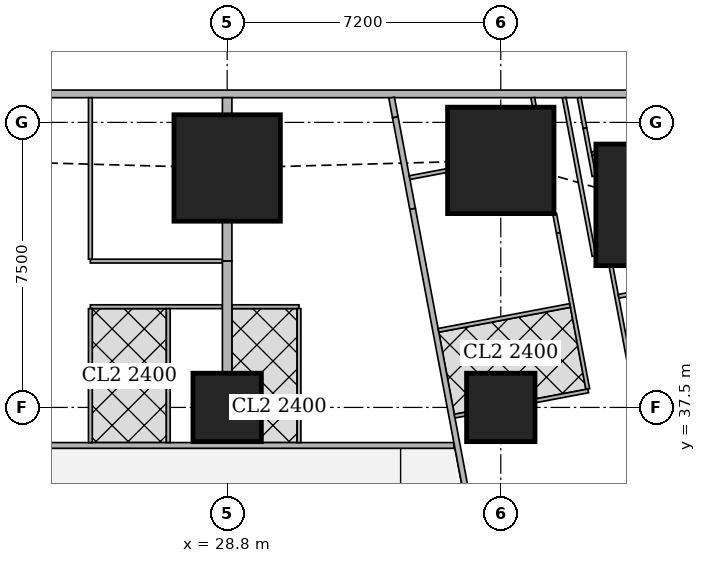
"""IFC4 building model, lengths in metres.
Left out: names, types, materials, properties, quantities, classifications, styles, units other than length and angle.
Written with IfcOpenShell. Run it as: python <this file> out.ifc"""

import sys

from ifc_helpers import new_model, si_unit, direction, frame, frame_2d, origin, origin_2d, place, context, subcontext, project, spatial, rectangle, extrude, element, fill, save


model = new_model("IFC4")
c1 = context("Model", 3, precision=1e-05, world=origin(), true_north=direction((0.0, 1.0)))
c2 = subcontext(c1, "Body", "Model", "MODEL_VIEW")
j1 = project(units=[si_unit("LENGTHUNIT", "METRE"), si_unit("PLANEANGLEUNIT", "RADIAN")], contexts=[c1])
p1 = place(None, origin())
s1 = spatial("IfcSite", under=j1, at=p1, CompositionType="ELEMENT")
p2 = place(p1, origin())
s2 = spatial("IfcBuilding", under=s1, at=p2, CompositionType="ELEMENT")
p3 = place(p2, frame((0.0, 0.0, 42.5)))
s3 = spatial("IfcBuildingStorey", under=s2, at=p3, CompositionType="ELEMENT", Elevation=42.5)
for number, where, z_axis, x_axis in (
    (1, (28.8, 37.5, 0.0), (0.0, 0.0, 1.0), (1.0, 0.0, 0.0)),
    (2, (36.0, 37.5, 0.0), (0.0, 0.0, 1.0), (1.0, 0.0, 0.0)),
):
    element("IfcColumn", number, at=place(p3, frame(where, z_axis=z_axis, x_axis=x_axis)), inside=s3, PredefinedType="COLUMN", context=c2, shape_type="SweptSolid", body=[
        extrude(rectangle(XDim=1.8, YDim=1.8, at=origin_2d()), origin(), (0.0, 0.0, 1.0), 3.75),
    ])
p4 = place(p3, frame((40.102, 42.83, 0.0), z_axis=(0.0, 0.0, 1.0), x_axis=(1.0, 0.0, 0.0)))
e3 = element("IfcColumn", 3, at=p4, inside=s3, PredefinedType="COLUMN", context=c2, shape_type="SweptSolid", body=[
    extrude(rectangle(XDim=3.2, YDim=3.2, at=origin_2d()), origin(), (0.0, 0.0, 1.0), 3.75),
])
for number, where, z_axis, x_axis in (
    (4, (28.8, 43.8, 0.0), (0.0, 0.0, 1.0), (1.0, 0.0, 0.0)),
    (5, (36.0, 44.0, 0.0), (0.0, 0.0, 1.0), (1.0, 0.0, 0.0)),
):
    element("IfcColumn", number, at=place(p3, frame(where, z_axis=z_axis, x_axis=x_axis)), inside=s3, PredefinedType="COLUMN", context=c2, shape_type="SweptSolid", body=[
        extrude(rectangle(XDim=2.8, YDim=2.8, at=origin_2d()), origin(), (0.0, 0.0, 1.0), 3.75),
    ])
p5 = place(p3, frame((40.106, 45.75, 0.0), z_axis=(0.0, 0.0, 1.0), x_axis=(-1.0, 0.0, 0.0)))
e6 = element("IfcWall", 6, at=p5, inside=s3, PredefinedType="SOLIDWALL", context=c2, shape_type="SweptSolid", body=[
    extrude(rectangle(XDim=37.943, YDim=0.2, at=frame_2d((18.971, 0.0))), origin(), (0.0, 0.0, 1.0), 3.5),
])
p6 = place(p5, frame((8.606, 0.0, 0.9)))
e7 = element("IfcOpeningElement", 7, at=p6, cuts=e6, PredefinedType="OPENING", context=c2, shape_type="SweptSolid", body=[
    extrude(rectangle(XDim=1.8, YDim=1.5, at=frame_2d((0.9, 0.75))), frame((0.0, 0.11, 0.0), z_axis=(0.0, -1.0, 0.0), x_axis=(1.0, 0.0, 0.0)), (0.0, 0.0, 1.0), 0.22),
])
p7 = place(p5, frame((12.206, 0.0, 0.9)))
e8 = element("IfcOpeningElement", 8, at=p7, cuts=e6, PredefinedType="OPENING", context=c2, shape_type="SweptSolid", body=[
    extrude(rectangle(XDim=1.8, YDim=1.5, at=frame_2d((0.9, 0.75))), frame((0.0, 0.11, 0.0), z_axis=(0.0, -1.0, 0.0), x_axis=(1.0, 0.0, 0.0)), (0.0, 0.0, 1.0), 0.22),
])
p8 = place(p5, frame((15.806, 0.0, 0.9)))
e9 = element("IfcOpeningElement", 9, at=p8, cuts=e6, PredefinedType="OPENING", context=c2, shape_type="SweptSolid", body=[
    extrude(rectangle(XDim=1.8, YDim=1.5, at=frame_2d((0.9, 0.75))), frame((0.0, 0.11, 0.0), z_axis=(0.0, -1.0, 0.0), x_axis=(1.0, 0.0, 0.0)), (0.0, 0.0, 1.0), 0.22),
])
p9 = place(p5, frame((19.406, 0.0, 0.9)))
e10 = element("IfcOpeningElement", 10, at=p9, cuts=e6, PredefinedType="OPENING", context=c2, shape_type="SweptSolid", body=[
    extrude(rectangle(XDim=1.8, YDim=1.5, at=frame_2d((0.9, 0.75))), frame((0.0, 0.11, 0.0), z_axis=(0.0, -1.0, 0.0), x_axis=(1.0, 0.0, 0.0)), (0.0, 0.0, 1.0), 0.22),
])
p10 = place(p5, frame((23.006, 0.0, 0.9)))
e11 = element("IfcOpeningElement", 11, at=p10, cuts=e6, PredefinedType="OPENING", context=c2, shape_type="SweptSolid", body=[
    extrude(rectangle(XDim=1.8, YDim=1.5, at=frame_2d((0.9, 0.75))), frame((0.0, 0.11, 0.0), z_axis=(0.0, -1.0, 0.0), x_axis=(1.0, 0.0, 0.0)), (0.0, 0.0, 1.0), 0.22),
])
p11 = place(p5, frame((26.606, 0.0, 0.9)))
e12 = element("IfcOpeningElement", 12, at=p11, cuts=e6, PredefinedType="OPENING", context=c2, shape_type="SweptSolid", body=[
    extrude(rectangle(XDim=1.8, YDim=1.5, at=frame_2d((0.9, 0.75))), frame((0.0, 0.11, 0.0), z_axis=(0.0, -1.0, 0.0), x_axis=(1.0, 0.0, 0.0)), (0.0, 0.0, 1.0), 0.22),
])
p12 = place(p3, frame((8.35, 36.5, 0.0), z_axis=(0.0, 0.0, 1.0), x_axis=(1.0, 0.0, 0.0)))
e13 = element("IfcWall", 13, at=p12, inside=s3, PredefinedType="SOLIDWALL", context=c2, shape_type="SweptSolid", body=[
    extrude(rectangle(XDim=26.415, YDim=0.15, at=frame_2d((13.208, 0.0))), origin(), (0.0, 0.0, 1.0), 3.5),
])
p13 = place(p12, frame((3.383, 0.0, 0.0)))
e14 = element("IfcOpeningElement", 14, at=p13, cuts=e13, PredefinedType="OPENING", context=c2, shape_type="SweptSolid", body=[
    extrude(rectangle(XDim=1.0, YDim=2.1, at=frame_2d((0.5, 1.05))), frame((0.0, 0.085, 0.0), z_axis=(0.0, -1.0, 0.0), x_axis=(1.0, 0.0, 0.0)), (0.0, 0.0, 1.0), 0.17),
])
p14 = place(p12, frame((7.65, 0.0, 0.0)))
e15 = element("IfcOpeningElement", 15, at=p14, cuts=e13, PredefinedType="OPENING", context=c2, shape_type="SweptSolid", body=[
    extrude(rectangle(XDim=1.0, YDim=2.1, at=frame_2d((0.5, 1.05))), frame((0.0, 0.085, 0.0), z_axis=(0.0, -1.0, 0.0), x_axis=(1.0, 0.0, 0.0)), (0.0, 0.0, 1.0), 0.17),
])
p15 = place(p12, frame((14.85, 0.0, 0.0)))
e16 = element("IfcOpeningElement", 16, at=p15, cuts=e13, PredefinedType="OPENING", context=c2, shape_type="SweptSolid", body=[
    extrude(rectangle(XDim=1.0, YDim=2.1, at=frame_2d((0.5, 1.05))), frame((0.0, 0.085, 0.0), z_axis=(0.0, -1.0, 0.0), x_axis=(1.0, 0.0, 0.0)), (0.0, 0.0, 1.0), 0.17),
])
p16 = place(p12, frame((23.923, 0.0, 0.0)))
e17 = element("IfcOpeningElement", 17, at=p16, cuts=e13, PredefinedType="OPENING", context=c2, shape_type="SweptSolid", body=[
    extrude(rectangle(XDim=1.0, YDim=2.1, at=frame_2d((0.5, 1.05))), frame((0.0, 0.085, 0.0), z_axis=(0.0, -1.0, 0.0), x_axis=(1.0, 0.0, 0.0)), (0.0, 0.0, 1.0), 0.17),
])
p17 = place(p3, frame((33.127, 45.65, 0.0), z_axis=(0.0, 0.0, 1.0), x_axis=(0.185441815104, -0.982655246366, 0.0)))
e18 = element("IfcWall", 18, at=p17, inside=s3, PredefinedType="SOLIDWALL", context=c2, shape_type="SweptSolid", body=[
    extrude(rectangle(XDim=0.524, YDim=0.15, at=frame_2d((0.262, 0.0))), origin(), (0.0, 0.0, 1.0), 3.5),
])
p18 = place(p3, frame((33.224, 45.135, 0.0), z_axis=(0.0, 0.0, 1.0), x_axis=(0.185681462868, -0.982609990967, 0.0)))
e19 = element("IfcWall", 19, at=p18, inside=s3, PredefinedType="SOLIDWALL", context=c2, shape_type="SweptSolid", body=[
    extrude(rectangle(XDim=2.455, YDim=0.15, at=frame_2d((1.228, 0.0))), origin(), (0.0, 0.0, 1.0), 2.05),
])
p19 = place(p3, frame((33.68, 42.723, 0.0), z_axis=(0.0, 0.0, 1.0), x_axis=(0.185624129307, -0.98262082342, 0.0)))
e20 = element("IfcWall", 20, at=p19, inside=s3, PredefinedType="SOLIDWALL", context=c2, shape_type="SweptSolid", body=[
    extrude(rectangle(XDim=41.051, YDim=0.15, at=frame_2d((20.526, 0.0))), origin(), (0.0, 0.0, 1.0), 2.5),
])
p20 = place(p19, frame((7.73, 0.0, 0.0)))
e21 = element("IfcOpeningElement", 21, at=p20, cuts=e20, PredefinedType="OPENING", context=c2, shape_type="SweptSolid", body=[
    extrude(rectangle(XDim=1.0, YDim=2.1, at=frame_2d((0.5, 1.05))), frame((0.0, 0.085, 0.0), z_axis=(0.0, -1.0, 0.0), x_axis=(1.0, 0.0, 0.0)), (0.0, 0.0, 1.0), 0.17),
])
p21 = place(p19, frame((12.307, 0.0, 0.0)))
e22 = element("IfcOpeningElement", 22, at=p21, cuts=e20, PredefinedType="OPENING", context=c2, shape_type="SweptSolid", body=[
    extrude(rectangle(XDim=1.0, YDim=2.1, at=frame_2d((0.5, 1.05))), frame((0.0, 0.085, 0.0), z_axis=(0.0, -1.0, 0.0), x_axis=(1.0, 0.0, 0.0)), (0.0, 0.0, 1.0), 0.17),
])
p22 = place(p19, frame((19.938, 0.0, 0.0)))
e23 = element("IfcOpeningElement", 23, at=p22, cuts=e20, PredefinedType="OPENING", context=c2, shape_type="SweptSolid", body=[
    extrude(rectangle(XDim=1.0, YDim=2.1, at=frame_2d((0.5, 1.05))), frame((0.0, 0.085, 0.0), z_axis=(0.0, -1.0, 0.0), x_axis=(1.0, 0.0, 0.0)), (0.0, 0.0, 1.0), 0.17),
])
p23 = place(p19, frame((32.193, 0.0, 0.0)))
e24 = element("IfcOpeningElement", 24, at=p23, cuts=e20, PredefinedType="OPENING", context=c2, shape_type="SweptSolid", body=[
    extrude(rectangle(XDim=1.0, YDim=2.1, at=frame_2d((0.5, 1.05))), frame((0.0, 0.085, 0.0), z_axis=(0.0, -1.0, 0.0), x_axis=(1.0, 0.0, 0.0)), (0.0, 0.0, 1.0), 0.17),
])
p24 = place(p3, frame((38.454, 41.483, 0.0), z_axis=(0.0, 0.0, 1.0), x_axis=(-0.185609245326, 0.982623634994, 0.0)))
e25 = element("IfcWall", 25, at=p24, inside=s3, PredefinedType="PARTITIONING", context=c2, shape_type="SweptSolid", body=[
    extrude(rectangle(XDim=4.241, YDim=0.1, at=frame_2d((2.12, 0.0))), origin(), (0.0, 0.0, 1.0), 2.05),
])
p25 = place(p3, frame((38.063, 45.65, 0.0), z_axis=(0.0, 0.0, 1.0), x_axis=(0.186109918919, -0.982528929895, 0.0)))
e26 = element("IfcWall", 26, at=p25, inside=s3, PredefinedType="PARTITIONING", context=c2, shape_type="SweptSolid", body=[
    extrude(rectangle(XDim=0.817, YDim=0.1, at=frame_2d((0.409, 0.0))), origin(), (0.0, 0.0, 1.0), 3.5),
])
p26 = place(p3, frame((38.215, 44.847, 0.0), z_axis=(0.0, 0.0, 1.0), x_axis=(0.185310800156, -0.982679961811, 0.0)))
e27 = element("IfcWall", 27, at=p26, inside=s3, PredefinedType="PARTITIONING", context=c2, shape_type="SweptSolid", body=[
    extrude(rectangle(XDim=1.283, YDim=0.1, at=frame_2d((0.642, 0.0))), origin(), (0.0, 0.0, 1.0), 2.05),
])
p27 = place(p3, frame((38.899, 41.22, 0.0), z_axis=(0.0, 0.0, 1.0), x_axis=(0.185517409072, -0.982640977637, 0.0)))
e28 = element("IfcWall", 28, at=p27, inside=s3, PredefinedType="PARTITIONING", context=c2, shape_type="SweptSolid", body=[
    extrude(rectangle(XDim=4.426, YDim=0.1, at=frame_2d((2.213, 0.0))), origin(), (0.0, 0.0, 1.0), 3.5),
])
p28 = place(p27, frame((1.9, 0.0, 0.0)))
e29 = element("IfcOpeningElement", 29, at=p28, cuts=e28, PredefinedType="OPENING", context=c2, shape_type="SweptSolid", body=[
    extrude(rectangle(XDim=0.9, YDim=2.1, at=frame_2d((0.45, 1.05))), frame((0.0, 0.06, 0.0), z_axis=(0.0, -1.0, 0.0), x_axis=(1.0, 0.0, 0.0)), (0.0, 0.0, 1.0), 0.12),
])
p29 = place(p3, frame((36.841, 45.65, 0.0), z_axis=(0.0, 0.0, 1.0), x_axis=(0.183986661451, -0.982928740249, 0.0)))
e30 = element("IfcWall", 30, at=p29, inside=s3, PredefinedType="PARTITIONING", context=c2, shape_type="SweptSolid", body=[
    extrude(rectangle(XDim=0.244, YDim=0.1, at=frame_2d((0.122, 0.0))), origin(), (0.0, 0.0, 1.0), 3.5),
])
p30 = place(p3, frame((37.417, 42.602, 0.0), z_axis=(0.0, 0.0, 1.0), x_axis=(0.185672001976, -0.982611778721, 0.0)))
e31 = element("IfcWall", 31, at=p30, inside=s3, PredefinedType="PARTITIONING", context=c2, shape_type="SweptSolid", body=[
    extrude(rectangle(XDim=0.522, YDim=0.1, at=frame_2d((0.261, 0.0))), origin(), (0.0, 0.0, 1.0), 2.05),
])
p31 = place(p3, frame((37.514, 42.089, 0.0), z_axis=(0.0, 0.0, 1.0), x_axis=(0.185540945282, -0.982636533833, 0.0)))
e32 = element("IfcWall", 32, at=p31, inside=s3, PredefinedType="PARTITIONING", context=c2, shape_type="SweptSolid", body=[
    extrude(rectangle(XDim=4.178, YDim=0.1, at=frame_2d((2.089, 0.0))), origin(), (0.0, 0.0, 1.0), 3.5),
])
p32 = place(p31, frame((2.63, 0.0, 0.0)))
e33 = element("IfcOpeningElement", 33, at=p32, cuts=e32, PredefinedType="OPENING", context=c2, shape_type="SweptSolid", body=[
    extrude(rectangle(XDim=0.9, YDim=2.1, at=frame_2d((0.45, 1.05))), frame((0.0, 0.06, 0.0), z_axis=(0.0, -1.0, 0.0), x_axis=(1.0, 0.0, 0.0)), (0.0, 0.0, 1.0), 0.12),
])
p33 = place(p3, frame((38.492, 44.193, 0.0), z_axis=(0.0, 0.0, 1.0), x_axis=(-0.981954528773, -0.189117168504, 0.0)))
e34 = element("IfcWall", 34, at=p33, inside=s3, PredefinedType="PARTITIONING", context=c2, shape_type="SweptSolid", body=[
    extrude(rectangle(XDim=0.101, YDim=0.1, at=frame_2d((0.05, 0.0))), origin(), (0.0, 0.0, 1.0), 2.05),
])
p34 = place(p3, frame((43.277, 41.212, 0.0), z_axis=(0.0, 0.0, 1.0), x_axis=(-0.982665405803, -0.185387972203, 0.0)))
e35 = element("IfcWall", 35, at=p34, inside=s3, PredefinedType="PARTITIONING", context=c2, shape_type="SweptSolid", body=[
    extrude(rectangle(XDim=4.25, YDim=0.1, at=frame_2d((2.125, 0.0))), origin(), (0.0, 0.0, 1.0), 2.05),
])
p35 = place(p3, frame((34.59, 43.734, 0.0), z_axis=(0.0, 0.0, 1.0), x_axis=(-0.982632457012, -0.185562535081, 0.0)))
e36 = element("IfcWall", 36, at=p35, inside=s3, PredefinedType="PARTITIONING", context=c2, shape_type="SweptSolid", body=[
    extrude(rectangle(XDim=1.007, YDim=0.1, at=frame_2d((0.503, 0.0))), origin(), (0.0, 0.0, 1.0), 2.05),
])
p36 = place(p3, frame((37.823, 40.182, 0.0), z_axis=(0.0, 0.0, 1.0), x_axis=(-0.98263926043, -0.185526504472, 0.0)))
e37 = element("IfcWall", 37, at=p36, inside=s3, PredefinedType="PARTITIONING", context=c2, shape_type="SweptSolid", body=[
    extrude(rectangle(XDim=3.524, YDim=0.1, at=frame_2d((1.762, 0.0))), origin(), (0.0, 0.0, 1.0), 3.5),
])
p37 = place(p3, frame((38.299, 37.935, 0.0), z_axis=(0.0, 0.0, 1.0), x_axis=(-0.982680053146, -0.185310315822, 0.0)))
e38 = element("IfcWall", 38, at=p37, inside=s3, PredefinedType="PARTITIONING", context=c2, shape_type="SweptSolid", body=[
    extrude(rectangle(XDim=1.414, YDim=0.1, at=frame_2d((0.707, 0.0))), origin(), (0.0, 0.0, 1.0), 3.5),
])
p38 = place(p3, frame((35.09, 37.328, 0.0), z_axis=(0.0, 0.0, 1.0), x_axis=(-0.982961380226, -0.183812200315, 0.0)))
e39 = element("IfcWall", 39, at=p38, inside=s3, PredefinedType="PARTITIONING", context=c2, shape_type="SweptSolid", body=[
    extrude(rectangle(XDim=0.31, YDim=0.1, at=frame_2d((0.155, 0.0))), origin(), (0.0, 0.0, 1.0), 3.5),
])
p39 = place(p3, frame((25.2, 41.35, 0.0), z_axis=(0.0, 0.0, 1.0), x_axis=(1.0, 0.0, 0.0)))
e40 = element("IfcWall", 40, at=p39, inside=s3, PredefinedType="PARTITIONING", context=c2, shape_type="SweptSolid", body=[
    extrude(rectangle(XDim=3.475, YDim=0.1, at=frame_2d((1.738, 0.0))), origin(), (0.0, 0.0, 1.0), 3.5),
])
p40 = place(p39, frame((0.2, 0.0, 0.0)))
e41 = element("IfcOpeningElement", 41, at=p40, cuts=e40, PredefinedType="OPENING", context=c2, shape_type="SweptSolid", body=[
    extrude(rectangle(XDim=0.9, YDim=2.1, at=frame_2d((0.45, 1.05))), frame((0.0, 0.06, 0.0), z_axis=(0.0, -1.0, 0.0), x_axis=(1.0, 0.0, 0.0)), (0.0, 0.0, 1.0), 0.12),
])
p41 = place(p3, frame((25.2, 40.15, 0.0), z_axis=(0.0, 0.0, 1.0), x_axis=(1.0, 0.0, 0.0)))
e42 = element("IfcWall", 42, at=p41, inside=s3, PredefinedType="PARTITIONING", context=c2, shape_type="SweptSolid", body=[
    extrude(rectangle(XDim=3.475, YDim=0.1, at=frame_2d((1.738, 0.0))), origin(), (0.0, 0.0, 1.0), 3.5),
])
p42 = place(p41, frame((0.575, 0.0, 0.0)))
e43 = element("IfcOpeningElement", 43, at=p42, cuts=e42, PredefinedType="OPENING", context=c2, shape_type="SweptSolid", body=[
    extrude(rectangle(XDim=0.9, YDim=2.1, at=frame_2d((0.45, 1.05))), frame((0.0, 0.06, 0.0), z_axis=(0.0, -1.0, 0.0), x_axis=(1.0, 0.0, 0.0)), (0.0, 0.0, 1.0), 0.12),
])
p43 = place(p41, frame((2.375, 0.0, 0.0)))
e44 = element("IfcOpeningElement", 44, at=p43, cuts=e42, PredefinedType="OPENING", context=c2, shape_type="SweptSolid", body=[
    extrude(rectangle(XDim=0.9, YDim=2.1, at=frame_2d((0.45, 1.05))), frame((0.0, 0.06, 0.0), z_axis=(0.0, -1.0, 0.0), x_axis=(1.0, 0.0, 0.0)), (0.0, 0.0, 1.0), 0.12),
])
p44 = place(p3, frame((25.2, 41.4, 0.0), z_axis=(0.0, 0.0, 1.0), x_axis=(0.0, 1.0, 0.0)))
e45 = element("IfcWall", 45, at=p44, inside=s3, PredefinedType="PARTITIONING", context=c2, shape_type="SweptSolid", body=[
    extrude(rectangle(XDim=4.25, YDim=0.1, at=frame_2d((2.125, 0.0))), origin(), (0.0, 0.0, 1.0), 2.05),
])
for number, where, z_axis, x_axis in (
    (46, (25.2, 36.575, 0.0), (0.0, 0.0, 1.0), (0.0, 1.0, 0.0)),
    (47, (27.25, 36.575, 0.0), (0.0, 0.0, 1.0), (0.0, 1.0, 0.0)),
):
    element("IfcWall", number, at=place(p3, frame(where, z_axis=z_axis, x_axis=x_axis)), inside=s3, PredefinedType="PARTITIONING", context=c2, shape_type="SweptSolid", body=[
        extrude(rectangle(XDim=3.525, YDim=0.1, at=frame_2d((1.763, 0.0))), origin(), (0.0, 0.0, 1.0), 3.5),
    ])
p45 = place(p3, frame((28.925, 40.15, 0.0), z_axis=(0.0, 0.0, 1.0), x_axis=(1.0, 0.0, 0.0)))
e48 = element("IfcWall", 48, at=p45, inside=s3, PredefinedType="PARTITIONING", context=c2, shape_type="SweptSolid", body=[
    extrude(rectangle(XDim=1.765, YDim=0.1, at=frame_2d((0.882, 0.0))), origin(), (0.0, 0.0, 1.0), 3.5),
])
p46 = place(p45, frame((0.375, 0.0, 0.0)))
e49 = element("IfcOpeningElement", 49, at=p46, cuts=e48, PredefinedType="OPENING", context=c2, shape_type="SweptSolid", body=[
    extrude(rectangle(XDim=0.9, YDim=2.1, at=frame_2d((0.45, 1.05))), frame((0.0, 0.06, 0.0), z_axis=(0.0, -1.0, 0.0), x_axis=(1.0, 0.0, 0.0)), (0.0, 0.0, 1.0), 0.12),
])
p47 = place(p3, frame((30.69, 36.575, 0.0), z_axis=(0.0, 0.0, 1.0), x_axis=(0.0, 1.0, 0.0)))
e50 = element("IfcWall", 50, at=p47, inside=s3, PredefinedType="PARTITIONING", context=c2, shape_type="SweptSolid", body=[
    extrude(rectangle(XDim=3.525, YDim=0.1, at=frame_2d((1.763, 0.0))), origin(), (0.0, 0.0, 1.0), 3.5),
])
p48 = place(p3, frame((28.8, 41.35, 0.0), z_axis=(0.0, 0.0, 1.0), x_axis=(0.0, 1.0, 0.0)))
e51 = element("IfcWall", 51, at=p48, inside=s3, PredefinedType="SOLIDWALL", context=c2, shape_type="SweptSolid", body=[
    extrude(rectangle(XDim=1.049, YDim=0.25, at=frame_2d((0.524, 0.0))), origin(), (0.0, 0.0, 1.0), 3.5),
])
p49 = place(p3, frame((28.8, 45.201, 0.0), z_axis=(0.0, 0.0, 1.0), x_axis=(0.0, 1.0, 0.0)))
e52 = element("IfcWall", 52, at=p49, inside=s3, PredefinedType="SOLIDWALL", context=c2, shape_type="SweptSolid", body=[
    extrude(rectangle(XDim=0.449, YDim=0.25, at=frame_2d((0.225, 0.0))), origin(), (0.0, 0.0, 1.0), 3.5),
])
p50 = place(p3, frame((28.8, 38.401, 0.0), z_axis=(0.0, 0.0, 1.0), x_axis=(0.0, 1.0, 0.0)))
e53 = element("IfcWall", 53, at=p50, inside=s3, PredefinedType="SOLIDWALL", context=c2, shape_type="SweptSolid", body=[
    extrude(rectangle(XDim=2.949, YDim=0.25, at=frame_2d((1.475, 0.0))), origin(), (0.0, 0.0, 1.0), 3.5),
])
p51 = place(p6, origin())
e54 = element("IfcWindow", 54, at=p51, inside=s3, PartitioningType="SINGLE_PANEL", PredefinedType="WINDOW", context=c2, shape_type="SweptSolid", body=[
    extrude(rectangle(XDim=1.8, YDim=1.5, at=frame_2d((0.9, 0.75))), frame((0.0, 0.03, 0.0), z_axis=(0.0, -1.0, 0.0), x_axis=(1.0, 0.0, 0.0)), (0.0, 0.0, 1.0), 0.06),
])
fill(e7, e54)
p52 = place(p7, origin())
e55 = element("IfcWindow", 55, at=p52, inside=s3, PartitioningType="SINGLE_PANEL", PredefinedType="WINDOW", context=c2, shape_type="SweptSolid", body=[
    extrude(rectangle(XDim=1.8, YDim=1.5, at=frame_2d((0.9, 0.75))), frame((0.0, 0.03, 0.0), z_axis=(0.0, -1.0, 0.0), x_axis=(1.0, 0.0, 0.0)), (0.0, 0.0, 1.0), 0.06),
])
fill(e8, e55)
p53 = place(p8, origin())
e56 = element("IfcWindow", 56, at=p53, inside=s3, PartitioningType="SINGLE_PANEL", PredefinedType="WINDOW", context=c2, shape_type="SweptSolid", body=[
    extrude(rectangle(XDim=1.8, YDim=1.5, at=frame_2d((0.9, 0.75))), frame((0.0, 0.03, 0.0), z_axis=(0.0, -1.0, 0.0), x_axis=(1.0, 0.0, 0.0)), (0.0, 0.0, 1.0), 0.06),
])
fill(e9, e56)
p54 = place(p28, origin())
e57 = element("IfcDoor", 57, at=p54, inside=s3, OperationType="SINGLE_SWING_LEFT", PredefinedType="DOOR", context=c2, shape_type="SweptSolid", body=[
    extrude(rectangle(XDim=0.9, YDim=2.1, at=frame_2d((0.45, 1.05))), frame((0.0, 0.025, 0.0), z_axis=(0.0, -1.0, 0.0), x_axis=(1.0, 0.0, 0.0)), (0.0, 0.0, 1.0), 0.05),
])
fill(e29, e57)
p55 = place(p32, origin())
e58 = element("IfcDoor", 58, at=p55, inside=s3, OperationType="SINGLE_SWING_LEFT", PredefinedType="DOOR", context=c2, shape_type="SweptSolid", body=[
    extrude(rectangle(XDim=0.9, YDim=2.1, at=frame_2d((0.45, 1.05))), frame((0.0, 0.025, 0.0), z_axis=(0.0, -1.0, 0.0), x_axis=(1.0, 0.0, 0.0)), (0.0, 0.0, 1.0), 0.05),
])
fill(e33, e58)
p56 = place(p40, origin())
e59 = element("IfcDoor", 59, at=p56, inside=s3, OperationType="SINGLE_SWING_LEFT", PredefinedType="DOOR", context=c2, shape_type="SweptSolid", body=[
    extrude(rectangle(XDim=0.9, YDim=2.1, at=frame_2d((0.45, 1.05))), frame((0.0, 0.025, 0.0), z_axis=(0.0, -1.0, 0.0), x_axis=(1.0, 0.0, 0.0)), (0.0, 0.0, 1.0), 0.05),
])
fill(e41, e59)
p57 = place(p42, origin())
e60 = element("IfcDoor", 60, at=p57, inside=s3, OperationType="SINGLE_SWING_RIGHT", PredefinedType="DOOR", context=c2, shape_type="SweptSolid", body=[
    extrude(rectangle(XDim=0.9, YDim=2.1, at=frame_2d((0.45, 1.05))), frame((0.0, 0.025, 0.0), z_axis=(0.0, -1.0, 0.0), x_axis=(1.0, 0.0, 0.0)), (0.0, 0.0, 1.0), 0.05),
])
fill(e43, e60)
p58 = place(p43, origin())
e61 = element("IfcDoor", 61, at=p58, inside=s3, OperationType="SINGLE_SWING_LEFT", PredefinedType="DOOR", context=c2, shape_type="SweptSolid", body=[
    extrude(rectangle(XDim=0.9, YDim=2.1, at=frame_2d((0.45, 1.05))), frame((0.0, 0.025, 0.0), z_axis=(0.0, -1.0, 0.0), x_axis=(1.0, 0.0, 0.0)), (0.0, 0.0, 1.0), 0.05),
])
fill(e44, e61)
p59 = place(p15, origin())
e62 = element("IfcDoor", 62, at=p59, inside=s3, OperationType="SINGLE_SWING_RIGHT", PredefinedType="DOOR", context=c2, shape_type="SweptSolid", body=[
    extrude(rectangle(XDim=1.0, YDim=2.1, at=frame_2d((0.5, 1.05))), frame((0.0, 0.025, 0.0), z_axis=(0.0, -1.0, 0.0), x_axis=(1.0, 0.0, 0.0)), (0.0, 0.0, 1.0), 0.05),
])
fill(e16, e62)
p60 = place(p46, origin())
e63 = element("IfcDoor", 63, at=p60, inside=s3, OperationType="SINGLE_SWING_RIGHT", PredefinedType="DOOR", context=c2, shape_type="SweptSolid", body=[
    extrude(rectangle(XDim=0.9, YDim=2.1, at=frame_2d((0.45, 1.05))), frame((0.0, 0.025, 0.0), z_axis=(0.0, -1.0, 0.0), x_axis=(1.0, 0.0, 0.0)), (0.0, 0.0, 1.0), 0.05),
])
fill(e49, e63)
p61 = place(p16, origin())
e64 = element("IfcDoor", 64, at=p61, inside=s3, OperationType="SINGLE_SWING_RIGHT", PredefinedType="DOOR", context=c2, shape_type="SweptSolid", body=[
    extrude(rectangle(XDim=1.0, YDim=2.1, at=frame_2d((0.5, 1.05))), frame((0.0, 0.025, 0.0), z_axis=(0.0, -1.0, 0.0), x_axis=(1.0, 0.0, 0.0)), (0.0, 0.0, 1.0), 0.05),
])
fill(e17, e64)
save(model, sys.argv[1])
